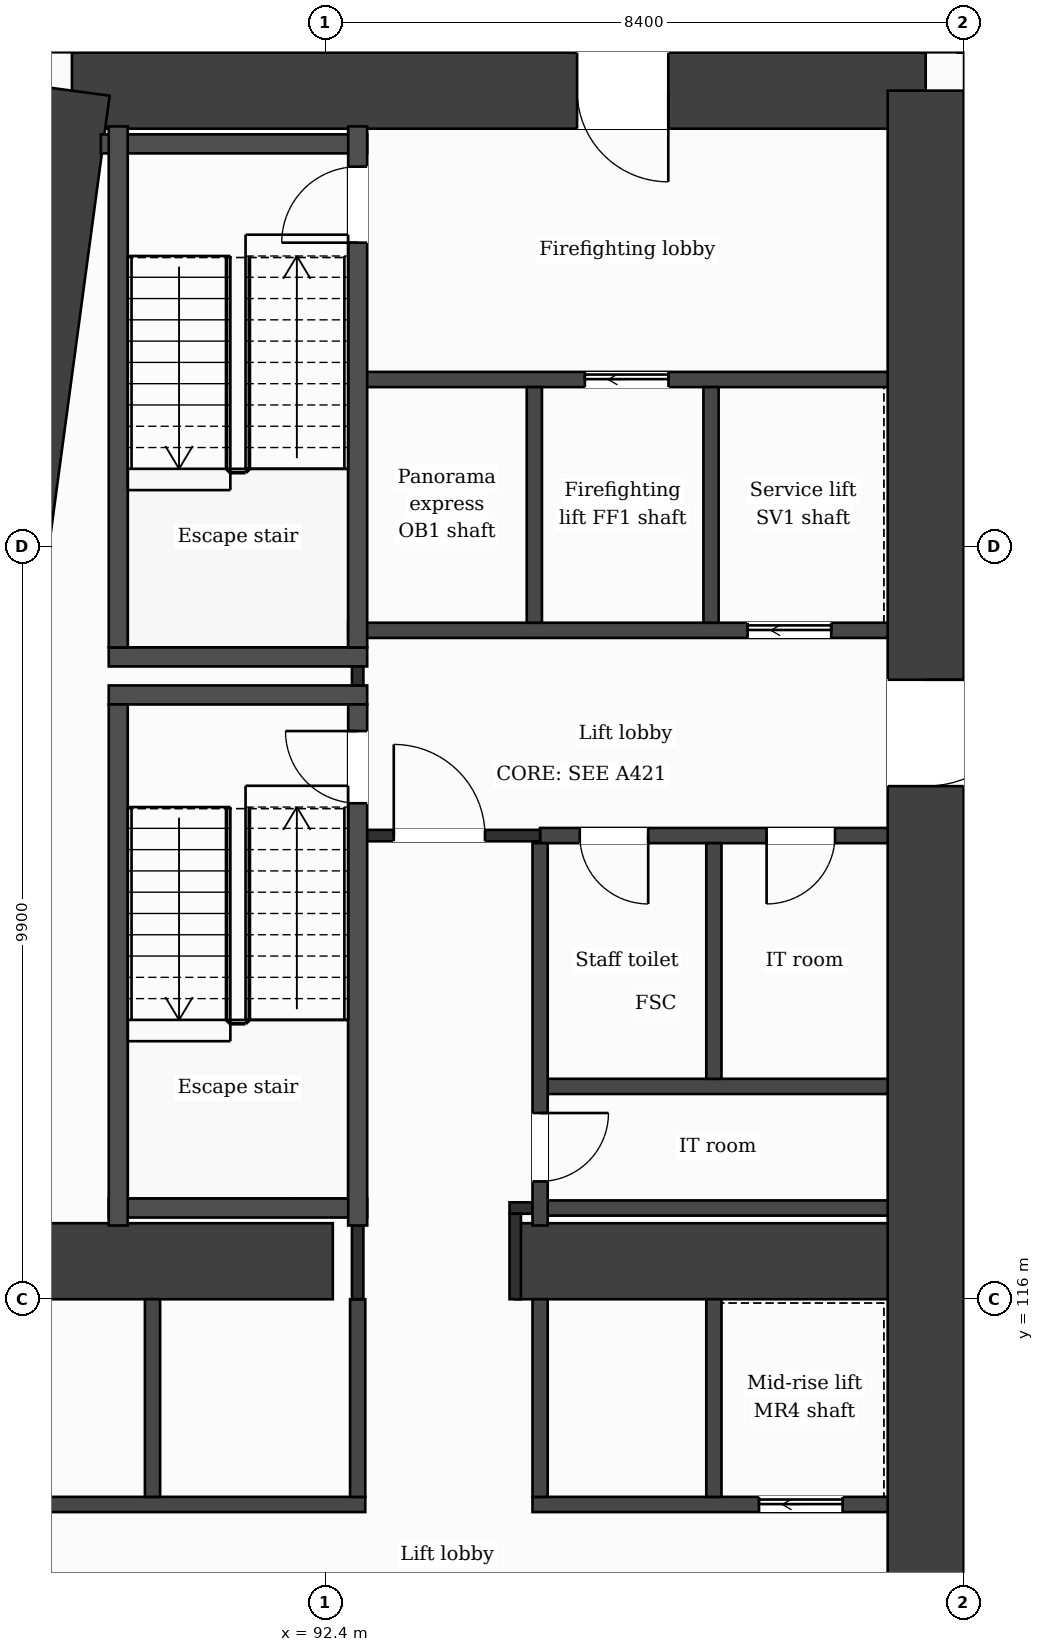
"""IFC4 building model, lengths in metres.
Left out: names, types, materials, properties, quantities, classifications, styles, units other than length and angle.
Written with IfcOpenShell. Run it as: python <this file> out.ifc"""

import sys

from ifc_helpers import new_model, si_unit, direction, frame, frame_2d, origin, place, context, subcontext, project, spatial, rectangle, extrude, element, fill, save


model = new_model("IFC4")
c1 = context("Model", 3, precision=1e-05, world=origin(), true_north=direction((0.0, 1.0)))
c2 = subcontext(c1, "Body", "Model", "MODEL_VIEW")
j1 = project(units=[si_unit("LENGTHUNIT", "METRE"), si_unit("PLANEANGLEUNIT", "RADIAN")], contexts=[c1])
p1 = place(None, origin())
s1 = spatial("IfcSite", under=j1, at=p1, CompositionType="ELEMENT")
p2 = place(p1, origin())
s2 = spatial("IfcBuilding", under=s1, at=p2, CompositionType="ELEMENT")
p3 = place(p2, frame((0.0, 0.0, 91.0)))
s3 = spatial("IfcBuildingStorey", under=s2, at=p3, CompositionType="ELEMENT", Elevation=91.0)
p4 = place(p3, frame((89.068, 131.9, 0.0), z_axis=(0.0, 0.0, 1.0), x_axis=(1.0, 0.0, 0.0)))
e1 = element("IfcWall", 1, at=p4, inside=s3, PredefinedType="SHEAR", context=c2, shape_type="SweptSolid", body=[
    extrude(rectangle(XDim=11.232, YDim=1.0, at=frame_2d((5.616, 0.0))), origin(), (0.0, 0.0, 1.0), 3.7),
])
p5 = place(p4, frame((6.646, 0.0, 0.0)))
e2 = element("IfcOpeningElement", 2, at=p5, cuts=e1, PredefinedType="OPENING", context=c2, shape_type="SweptSolid", body=[
    extrude(rectangle(XDim=1.2, YDim=2.1, at=frame_2d((0.6, 1.05))), frame((0.0, 0.51, 0.0), z_axis=(0.0, -1.0, 0.0), x_axis=(1.0, 0.0, 0.0)), (0.0, 0.0, 1.0), 1.02),
])
p6 = place(p3, frame((100.3, 131.9, 0.0), z_axis=(0.0, 0.0, 1.0), x_axis=(0.0, -1.0, 0.0)))
e3 = element("IfcWall", 3, at=p6, inside=s3, PredefinedType="SHEAR", context=c2, shape_type="SweptSolid", body=[
    extrude(rectangle(XDim=21.0, YDim=1.0, at=frame_2d((10.5, 0.0))), origin(), (0.0, 0.0, 1.0), 3.7),
])
p7 = place(p6, frame((7.75, 0.0, 0.0)))
e4 = element("IfcOpeningElement", 4, at=p7, cuts=e3, PredefinedType="OPENING", context=c2, shape_type="SweptSolid", body=[
    extrude(rectangle(XDim=1.4, YDim=2.1, at=frame_2d((0.7, 1.05))), frame((0.0, 0.51, 0.0), z_axis=(0.0, -1.0, 0.0), x_axis=(1.0, 0.0, 0.0)), (0.0, 0.0, 1.0), 1.02),
])
p8 = place(p3, frame((86.241, 110.9, 0.0), z_axis=(0.0, 0.0, 1.0), x_axis=(0.133411141623, 0.991060778808, 0.0)))
e5 = element("IfcWall", 5, at=p8, inside=s3, PredefinedType="SHEAR", context=c2, shape_type="SweptSolid", body=[
    extrude(rectangle(XDim=21.189, YDim=1.0, at=frame_2d((10.595, 0.0))), origin(), (0.0, 0.0, 1.0), 3.7),
])
p9 = place(p3, frame((87.423, 116.5, 0.0), z_axis=(0.0, 0.0, 1.0), x_axis=(1.0, 0.0, 0.0)))
e6 = element("IfcWall", 6, at=p9, inside=s3, PredefinedType="SHEAR", context=c2, shape_type="SweptSolid", body=[
    extrude(rectangle(XDim=5.077, YDim=1.0, at=frame_2d((2.539, 0.0))), origin(), (0.0, 0.0, 1.0), 3.7),
])
p10 = place(p3, frame((94.9, 116.5, 0.0), z_axis=(0.0, 0.0, 1.0), x_axis=(1.0, 0.0, 0.0)))
e7 = element("IfcWall", 7, at=p10, inside=s3, PredefinedType="SHEAR", context=c2, shape_type="SweptSolid", body=[
    extrude(rectangle(XDim=4.9, YDim=1.0, at=frame_2d((2.45, 0.0))), origin(), (0.0, 0.0, 1.0), 3.7),
])
p11 = place(p3, frame((91.177, 138.95, 0.0), z_axis=(0.0, 0.0, 1.0), x_axis=(-0.133426664613, -0.991058689065, 0.0)))
e8 = element("IfcWall", 8, at=p11, inside=s3, PredefinedType="SOLIDWALL", context=c2, shape_type="SweptSolid", body=[
    extrude(rectangle(XDim=6.609, YDim=0.3, at=frame_2d((3.305, 0.0))), origin(), (0.0, 0.0, 1.0), 3.38),
])
p12 = place(p11, frame((1.039, 0.0, 0.9)))
e9 = element("IfcOpeningElement", 9, at=p12, cuts=e8, PredefinedType="OPENING", context=c2, shape_type="SweptSolid", body=[
    extrude(rectangle(XDim=1.2, YDim=2.1, at=frame_2d((0.6, 1.05))), frame((0.0, 0.16, 0.0), z_axis=(0.0, -1.0, 0.0), x_axis=(1.0, 0.0, 0.0)), (0.0, 0.0, 1.0), 0.32),
])
p13 = place(p11, frame((4.294, 0.0, 0.0)))
e10 = element("IfcOpeningElement", 10, at=p13, cuts=e8, PredefinedType="OPENING", context=c2, shape_type="SweptSolid", body=[
    extrude(rectangle(XDim=1.2, YDim=2.4, at=frame_2d((0.6, 1.2))), frame((0.0, 0.16, 0.0), z_axis=(0.0, -1.0, 0.0), x_axis=(1.0, 0.0, 0.0)), (0.0, 0.0, 1.0), 0.32),
])
p14 = place(p3, frame((87.039, 113.3, 0.0), z_axis=(0.0, 0.0, 1.0), x_axis=(1.0, 0.0, 0.0)))
e11 = element("IfcWall", 11, at=p14, inside=s3, PredefinedType="PARTITIONING", context=c2, shape_type="SweptSolid", body=[
    extrude(rectangle(XDim=5.888, YDim=0.2, at=frame_2d((2.944, 0.0))), origin(), (0.0, 0.0, 1.0), 3.38),
])
p15 = place(p3, frame((95.127, 113.3, 0.0), z_axis=(0.0, 0.0, 1.0), x_axis=(1.0, 0.0, 0.0)))
e12 = element("IfcWall", 12, at=p15, inside=s3, PredefinedType="PARTITIONING", context=c2, shape_type="SweptSolid", body=[
    extrude(rectangle(XDim=4.673, YDim=0.2, at=frame_2d((2.336, 0.0))), origin(), (0.0, 0.0, 1.0), 3.38),
])
p16 = place(p15, frame((2.98, 0.0, 0.0)))
e13 = element("IfcOpeningElement", 13, at=p16, cuts=e12, PredefinedType="OPENING", context=c2, shape_type="SweptSolid", body=[
    extrude(rectangle(XDim=1.1, YDim=2.1, at=frame_2d((0.55, 1.05))), frame((0.0, 0.11, 0.0), z_axis=(0.0, -1.0, 0.0), x_axis=(1.0, 0.0, 0.0)), (0.0, 0.0, 1.0), 0.22),
])
p17 = place(p3, frame((95.227, 117.2, 0.0), z_axis=(0.0, 0.0, 1.0), x_axis=(1.0, 0.0, 0.0)))
e14 = element("IfcWall", 14, at=p17, inside=s3, PredefinedType="PARTITIONING", context=c2, shape_type="SweptSolid", body=[
    extrude(rectangle(XDim=4.573, YDim=0.2, at=frame_2d((2.287, 0.0))), origin(), (0.0, 0.0, 1.0), 3.38),
])
p18 = place(p3, frame((94.825, 117.2, 0.0), z_axis=(0.0, 0.0, 1.0), x_axis=(1.0, 0.0, 0.0)))
e15 = element("IfcWall", 15, at=p18, inside=s3, PredefinedType="PARTITIONING", context=c2, shape_type="SweptSolid", body=[
    extrude(rectangle(XDim=0.402, YDim=0.15, at=frame_2d((0.201, 0.0))), origin(), (0.0, 0.0, 1.0), 3.38),
])
p19 = place(p3, frame((89.552, 117.2, 0.0), z_axis=(0.0, 0.0, 1.0), x_axis=(1.0, 0.0, 0.0)))
e16 = element("IfcWall", 16, at=p19, inside=s3, PredefinedType="PARTITIONING", context=c2, shape_type="SweptSolid", body=[
    extrude(rectangle(XDim=3.4, YDim=0.25, at=frame_2d((1.7, 0.0))), origin(), (0.0, 0.0, 1.0), 3.38),
])
p20 = place(p3, frame((95.227, 118.8, 0.0), z_axis=(0.0, 0.0, 1.0), x_axis=(1.0, 0.0, 0.0)))
e17 = element("IfcWall", 17, at=p20, inside=s3, PredefinedType="PARTITIONING", context=c2, shape_type="SweptSolid", body=[
    extrude(rectangle(XDim=4.573, YDim=0.2, at=frame_2d((2.287, 0.0))), origin(), (0.0, 0.0, 1.0), 3.38),
])
p21 = place(p3, frame((95.227, 122.1, 0.0), z_axis=(0.0, 0.0, 1.0), x_axis=(1.0, 0.0, 0.0)))
e18 = element("IfcWall", 18, at=p21, inside=s3, PredefinedType="PARTITIONING", context=c2, shape_type="SweptSolid", body=[
    extrude(rectangle(XDim=4.573, YDim=0.2, at=frame_2d((2.287, 0.0))), origin(), (0.0, 0.0, 1.0), 3.38),
])
p22 = place(p21, frame((0.522, 0.0, 0.0)))
e19 = element("IfcOpeningElement", 19, at=p22, cuts=e18, PredefinedType="OPENING", context=c2, shape_type="SweptSolid", body=[
    extrude(rectangle(XDim=0.9, YDim=2.1, at=frame_2d((0.45, 1.05))), frame((0.0, 0.11, 0.0), z_axis=(0.0, -1.0, 0.0), x_axis=(1.0, 0.0, 0.0)), (0.0, 0.0, 1.0), 0.22),
])
p23 = place(p21, frame((2.98, 0.0, 0.0)))
e20 = element("IfcOpeningElement", 20, at=p23, cuts=e18, PredefinedType="OPENING", context=c2, shape_type="SweptSolid", body=[
    extrude(rectangle(XDim=0.9, YDim=2.1, at=frame_2d((0.45, 1.05))), frame((0.0, 0.11, 0.0), z_axis=(0.0, -1.0, 0.0), x_axis=(1.0, 0.0, 0.0)), (0.0, 0.0, 1.0), 0.22),
])
p24 = place(p3, frame((92.827, 122.1, 0.0), z_axis=(0.0, 0.0, 1.0), x_axis=(1.0, 0.0, 0.0)))
e21 = element("IfcWall", 21, at=p24, inside=s3, PredefinedType="PARTITIONING", context=c2, shape_type="SweptSolid", body=[
    extrude(rectangle(XDim=2.4, YDim=0.15, at=frame_2d((1.2, 0.0))), origin(), (0.0, 0.0, 1.0), 3.38),
])
p25 = place(p24, frame((0.475, 0.0, 0.0)))
e22 = element("IfcOpeningElement", 22, at=p25, cuts=e21, PredefinedType="OPENING", context=c2, shape_type="SweptSolid", body=[
    extrude(rectangle(XDim=1.2, YDim=2.1, at=frame_2d((0.6, 1.05))), frame((0.0, 0.085, 0.0), z_axis=(0.0, -1.0, 0.0), x_axis=(1.0, 0.0, 0.0)), (0.0, 0.0, 1.0), 0.17),
])
for number, where, z_axis, x_axis in (
    (23, (89.552, 123.95, 0.0), (0.0, 0.0, 1.0), (1.0, 0.0, 0.0)),
    (24, (89.552, 124.45, 0.0), (0.0, 0.0, 1.0), (1.0, 0.0, 0.0)),
):
    element("IfcWall", number, at=place(p3, frame(where, z_axis=z_axis, x_axis=x_axis)), inside=s3, PredefinedType="PARTITIONING", context=c2, shape_type="SweptSolid", body=[
        extrude(rectangle(XDim=3.4, YDim=0.25, at=frame_2d((1.7, 0.0))), origin(), (0.0, 0.0, 1.0), 3.38),
    ])
p26 = place(p3, frame((92.702, 124.8, 0.0), z_axis=(0.0, 0.0, 1.0), x_axis=(1.0, 0.0, 0.0)))
e25 = element("IfcWall", 25, at=p26, inside=s3, PredefinedType="PARTITIONING", context=c2, shape_type="SweptSolid", body=[
    extrude(rectangle(XDim=7.098, YDim=0.2, at=frame_2d((3.549, 0.0))), origin(), (0.0, 0.0, 1.0), 3.38),
])
p27 = place(p26, frame((5.255, 0.0, 0.0)))
e26 = element("IfcOpeningElement", 26, at=p27, cuts=e25, PredefinedType="OPENING", context=c2, shape_type="SweptSolid", body=[
    extrude(rectangle(XDim=1.1, YDim=2.1, at=frame_2d((0.55, 1.05))), frame((0.0, 0.11, 0.0), z_axis=(0.0, -1.0, 0.0), x_axis=(1.0, 0.0, 0.0)), (0.0, 0.0, 1.0), 0.22),
])
p28 = place(p3, frame((92.827, 128.1, 0.0), z_axis=(0.0, 0.0, 1.0), x_axis=(1.0, 0.0, 0.0)))
e27 = element("IfcWall", 27, at=p28, inside=s3, PredefinedType="PARTITIONING", context=c2, shape_type="SweptSolid", body=[
    extrude(rectangle(XDim=6.973, YDim=0.2, at=frame_2d((3.487, 0.0))), origin(), (0.0, 0.0, 1.0), 3.38),
])
p29 = place(p28, frame((2.989, 0.0, 0.0)))
e28 = element("IfcOpeningElement", 28, at=p29, cuts=e27, PredefinedType="OPENING", context=c2, shape_type="SweptSolid", body=[
    extrude(rectangle(XDim=1.1, YDim=2.1, at=frame_2d((0.55, 1.05))), frame((0.0, 0.11, 0.0), z_axis=(0.0, -1.0, 0.0), x_axis=(1.0, 0.0, 0.0)), (0.0, 0.0, 1.0), 0.22),
])
p30 = place(p3, frame((89.448, 131.2, 0.0), z_axis=(0.0, 0.0, 1.0), x_axis=(1.0, 0.0, 0.0)))
e29 = element("IfcWall", 29, at=p30, inside=s3, PredefinedType="PARTITIONING", context=c2, shape_type="SweptSolid", body=[
    extrude(rectangle(XDim=3.504, YDim=0.25, at=frame_2d((1.752, 0.0))), origin(), (0.0, 0.0, 1.0), 3.38),
])
for number, where, z_axis, x_axis in (
    (30, (89.677, 116.97, 0.0), (0.0, 0.0, 1.0), (0.0, 1.0, 0.0)),
    (31, (89.677, 124.575, 0.0), (0.0, 0.0, 1.0), (0.0, 1.0, 0.0)),
):
    element("IfcWall", number, at=place(p3, frame(where, z_axis=z_axis, x_axis=x_axis)), inside=s3, PredefinedType="PARTITIONING", context=c2, shape_type="SweptSolid", body=[
        extrude(rectangle(XDim=6.855, YDim=0.25, at=frame_2d((3.427, 0.0))), origin(), (0.0, 0.0, 1.0), 3.38),
    ])
for number, where, z_axis, x_axis in (
    (32, (90.128, 113.4, 0.0), (0.0, 0.0, 1.0), (0.0, 1.0, 0.0)),
    (33, (92.827, 113.4, 0.0), (0.0, 0.0, 1.0), (0.0, 1.0, 0.0)),
):
    element("IfcWall", number, at=place(p3, frame(where, z_axis=z_axis, x_axis=x_axis)), inside=s3, PredefinedType="PARTITIONING", context=c2, shape_type="SweptSolid", body=[
        extrude(rectangle(XDim=2.6, YDim=0.2, at=frame_2d((1.3, 0.0))), origin(), (0.0, 0.0, 1.0), 3.38),
    ])
p31 = place(p3, frame((92.827, 116.0, 0.0), z_axis=(0.0, 0.0, 1.0), x_axis=(0.0, 1.0, 0.0)))
e34 = element("IfcWall", 34, at=p31, inside=s3, PredefinedType="PARTITIONING", context=c2, shape_type="SweptSolid", body=[
    extrude(rectangle(XDim=0.97, YDim=0.15, at=frame_2d((0.485, 0.0))), origin(), (0.0, 0.0, 1.0), 3.38),
])
p32 = place(p3, frame((92.827, 124.075, 0.0), z_axis=(0.0, 0.0, 1.0), x_axis=(0.0, 1.0, 0.0)))
e35 = element("IfcWall", 35, at=p32, inside=s3, PredefinedType="PARTITIONING", context=c2, shape_type="SweptSolid", body=[
    extrude(rectangle(XDim=0.25, YDim=0.15, at=frame_2d((0.125, 0.0))), origin(), (0.0, 0.0, 1.0), 3.38),
])
p33 = place(p3, frame((92.827, 116.97, 0.0), z_axis=(0.0, 0.0, 1.0), x_axis=(0.0, 1.0, 0.0)))
e36 = element("IfcWall", 36, at=p33, inside=s3, PredefinedType="PARTITIONING", context=c2, shape_type="SweptSolid", body=[
    extrude(rectangle(XDim=6.855, YDim=0.25, at=frame_2d((3.427, 0.0))), origin(), (0.0, 0.0, 1.0), 3.38),
])
p34 = place(p33, frame((5.555, 0.0, 0.0)))
e37 = element("IfcOpeningElement", 37, at=p34, cuts=e36, PredefinedType="OPENING", context=c2, shape_type="SweptSolid", body=[
    extrude(rectangle(XDim=0.95, YDim=2.1, at=frame_2d((0.475, 1.05))), frame((0.0, 0.135, 0.0), z_axis=(0.0, -1.0, 0.0), x_axis=(1.0, 0.0, 0.0)), (0.0, 0.0, 1.0), 0.27),
])
p35 = place(p3, frame((92.827, 124.575, 0.0), z_axis=(0.0, 0.0, 1.0), x_axis=(0.0, 1.0, 0.0)))
e38 = element("IfcWall", 38, at=p35, inside=s3, PredefinedType="PARTITIONING", context=c2, shape_type="SweptSolid", body=[
    extrude(rectangle(XDim=6.855, YDim=0.25, at=frame_2d((3.427, 0.0))), origin(), (0.0, 0.0, 1.0), 3.38),
])
p36 = place(p35, frame((5.325, 0.0, 0.0)))
e39 = element("IfcOpeningElement", 39, at=p36, cuts=e38, PredefinedType="OPENING", context=c2, shape_type="SweptSolid", body=[
    extrude(rectangle(XDim=1.0, YDim=2.1, at=frame_2d((0.5, 1.05))), frame((0.0, 0.135, 0.0), z_axis=(0.0, -1.0, 0.0), x_axis=(1.0, 0.0, 0.0)), (0.0, 0.0, 1.0), 0.27),
])
p37 = place(p3, frame((94.9, 116.0, 0.0), z_axis=(0.0, 0.0, 1.0), x_axis=(0.0, 1.0, 0.0)))
e40 = element("IfcWall", 40, at=p37, inside=s3, PredefinedType="PARTITIONING", context=c2, shape_type="SweptSolid", body=[
    extrude(rectangle(XDim=1.125, YDim=0.15, at=frame_2d((0.562, 0.0))), origin(), (0.0, 0.0, 1.0), 3.38),
])
p38 = place(p3, frame((95.151, 124.9, 0.0), z_axis=(0.0, 0.0, 1.0), x_axis=(0.0, 1.0, 0.0)))
e41 = element("IfcWall", 41, at=p38, inside=s3, PredefinedType="PARTITIONING", context=c2, shape_type="SweptSolid", body=[
    extrude(rectangle(XDim=3.1, YDim=0.2, at=frame_2d((1.55, 0.0))), origin(), (0.0, 0.0, 1.0), 3.38),
])
p39 = place(p3, frame((95.227, 113.4, 0.0), z_axis=(0.0, 0.0, 1.0), x_axis=(0.0, 1.0, 0.0)))
e42 = element("IfcWall", 42, at=p39, inside=s3, PredefinedType="PARTITIONING", context=c2, shape_type="SweptSolid", body=[
    extrude(rectangle(XDim=2.6, YDim=0.2, at=frame_2d((1.3, 0.0))), origin(), (0.0, 0.0, 1.0), 3.38),
])
p40 = place(p3, frame((95.227, 116.97, 0.0), z_axis=(0.0, 0.0, 1.0), x_axis=(0.0, 1.0, 0.0)))
e43 = element("IfcWall", 43, at=p40, inside=s3, PredefinedType="PARTITIONING", context=c2, shape_type="SweptSolid", body=[
    extrude(rectangle(XDim=5.03, YDim=0.2, at=frame_2d((2.515, 0.0))), origin(), (0.0, 0.0, 1.0), 3.38),
])
p41 = place(p40, frame((0.58, 0.0, 0.0)))
e44 = element("IfcOpeningElement", 44, at=p41, cuts=e43, PredefinedType="OPENING", context=c2, shape_type="SweptSolid", body=[
    extrude(rectangle(XDim=0.9, YDim=2.1, at=frame_2d((0.45, 1.05))), frame((0.0, 0.11, 0.0), z_axis=(0.0, -1.0, 0.0), x_axis=(1.0, 0.0, 0.0)), (0.0, 0.0, 1.0), 0.22),
])
p42 = place(p3, frame((97.476, 124.9, 0.0), z_axis=(0.0, 0.0, 1.0), x_axis=(0.0, 1.0, 0.0)))
e45 = element("IfcWall", 45, at=p42, inside=s3, PredefinedType="PARTITIONING", context=c2, shape_type="SweptSolid", body=[
    extrude(rectangle(XDim=3.1, YDim=0.2, at=frame_2d((1.55, 0.0))), origin(), (0.0, 0.0, 1.0), 3.38),
])
p43 = place(p3, frame((97.513, 113.4, 0.0), z_axis=(0.0, 0.0, 1.0), x_axis=(0.0, 1.0, 0.0)))
e46 = element("IfcWall", 46, at=p43, inside=s3, PredefinedType="PARTITIONING", context=c2, shape_type="SweptSolid", body=[
    extrude(rectangle(XDim=2.6, YDim=0.2, at=frame_2d((1.3, 0.0))), origin(), (0.0, 0.0, 1.0), 3.38),
])
p44 = place(p3, frame((97.513, 118.9, 0.0), z_axis=(0.0, 0.0, 1.0), x_axis=(0.0, 1.0, 0.0)))
e47 = element("IfcWall", 47, at=p44, inside=s3, PredefinedType="PARTITIONING", context=c2, shape_type="SweptSolid", body=[
    extrude(rectangle(XDim=3.1, YDim=0.2, at=frame_2d((1.55, 0.0))), origin(), (0.0, 0.0, 1.0), 3.38),
])
p45 = place(p25, origin())
e48 = element("IfcDoor", 48, at=p45, inside=s3, OperationType="SINGLE_SWING_LEFT", PredefinedType="DOOR", context=c2, shape_type="SweptSolid", body=[
    extrude(rectangle(XDim=1.2, YDim=2.1, at=frame_2d((0.6, 1.05))), frame((0.0, 0.025, 0.0), z_axis=(0.0, -1.0, 0.0), x_axis=(1.0, 0.0, 0.0)), (0.0, 0.0, 1.0), 0.05),
])
fill(e22, e48)
p46 = place(p29, origin())
e49 = element("IfcDoor", 49, at=p46, inside=s3, OperationType="SLIDING_TO_LEFT", PredefinedType="DOOR", context=c2, shape_type="SweptSolid", body=[
    extrude(rectangle(XDim=1.1, YDim=2.1, at=frame_2d((0.55, 1.05))), frame((0.0, 0.025, 0.0), z_axis=(0.0, -1.0, 0.0), x_axis=(1.0, 0.0, 0.0)), (0.0, 0.0, 1.0), 0.05),
])
fill(e28, e49)
p47 = place(p27, origin())
e50 = element("IfcDoor", 50, at=p47, inside=s3, OperationType="SLIDING_TO_LEFT", PredefinedType="DOOR", context=c2, shape_type="SweptSolid", body=[
    extrude(rectangle(XDim=1.1, YDim=2.1, at=frame_2d((0.55, 1.05))), frame((0.0, 0.025, 0.0), z_axis=(0.0, -1.0, 0.0), x_axis=(1.0, 0.0, 0.0)), (0.0, 0.0, 1.0), 0.05),
])
fill(e26, e50)
p48 = place(p22, origin())
e51 = element("IfcDoor", 51, at=p48, inside=s3, OperationType="SINGLE_SWING_RIGHT", PredefinedType="DOOR", context=c2, shape_type="SweptSolid", body=[
    extrude(rectangle(XDim=0.9, YDim=2.1, at=frame_2d((0.45, 1.05))), frame((0.0, 0.025, 0.0), z_axis=(0.0, -1.0, 0.0), x_axis=(1.0, 0.0, 0.0)), (0.0, 0.0, 1.0), 0.05),
])
fill(e19, e51)
p49 = place(p23, origin())
e52 = element("IfcDoor", 52, at=p49, inside=s3, OperationType="SINGLE_SWING_LEFT", PredefinedType="DOOR", context=c2, shape_type="SweptSolid", body=[
    extrude(rectangle(XDim=0.9, YDim=2.1, at=frame_2d((0.45, 1.05))), frame((0.0, 0.025, 0.0), z_axis=(0.0, -1.0, 0.0), x_axis=(1.0, 0.0, 0.0)), (0.0, 0.0, 1.0), 0.05),
])
fill(e20, e52)
p50 = place(p34, origin())
e53 = element("IfcDoor", 53, at=p50, inside=s3, OperationType="SINGLE_SWING_RIGHT", PredefinedType="DOOR", context=c2, shape_type="SweptSolid", body=[
    extrude(rectangle(XDim=0.95, YDim=2.1, at=frame_2d((0.475, 1.05))), frame((0.0, 0.025, 0.0), z_axis=(0.0, -1.0, 0.0), x_axis=(1.0, 0.0, 0.0)), (0.0, 0.0, 1.0), 0.05),
])
fill(e37, e53)
p51 = place(p36, origin())
e54 = element("IfcDoor", 54, at=p51, inside=s3, OperationType="SINGLE_SWING_LEFT", PredefinedType="DOOR", context=c2, shape_type="SweptSolid", body=[
    extrude(rectangle(XDim=1.0, YDim=2.1, at=frame_2d((0.5, 1.05))), frame((0.0, 0.025, 0.0), z_axis=(0.0, -1.0, 0.0), x_axis=(1.0, 0.0, 0.0)), (0.0, 0.0, 1.0), 0.05),
])
fill(e39, e54)
p52 = place(p41, origin())
e55 = element("IfcDoor", 55, at=p52, inside=s3, OperationType="SINGLE_SWING_RIGHT", PredefinedType="DOOR", context=c2, shape_type="SweptSolid", body=[
    extrude(rectangle(XDim=0.9, YDim=2.1, at=frame_2d((0.45, 1.05))), frame((0.0, 0.025, 0.0), z_axis=(0.0, -1.0, 0.0), x_axis=(1.0, 0.0, 0.0)), (0.0, 0.0, 1.0), 0.05),
])
fill(e44, e55)
p53 = place(p16, origin())
e56 = element("IfcDoor", 56, at=p53, inside=s3, OperationType="SLIDING_TO_LEFT", PredefinedType="DOOR", context=c2, shape_type="SweptSolid", body=[
    extrude(rectangle(XDim=1.1, YDim=2.1, at=frame_2d((0.55, 1.05))), frame((0.0, 0.025, 0.0), z_axis=(0.0, -1.0, 0.0), x_axis=(1.0, 0.0, 0.0)), (0.0, 0.0, 1.0), 0.05),
])
fill(e13, e56)
p54 = place(p5, origin())
e57 = element("IfcDoor", 57, at=p54, inside=s3, OperationType="SINGLE_SWING_RIGHT", PredefinedType="DOOR", context=c2, shape_type="SweptSolid", body=[
    extrude(rectangle(XDim=1.2, YDim=2.1, at=frame_2d((0.6, 1.05))), frame((0.0, 0.025, 0.0), z_axis=(0.0, -1.0, 0.0), x_axis=(1.0, 0.0, 0.0)), (0.0, 0.0, 1.0), 0.05),
])
fill(e2, e57)
p55 = place(p7, origin())
e58 = element("IfcDoor", 58, at=p55, inside=s3, OperationType="SINGLE_SWING_LEFT", PredefinedType="DOOR", context=c2, shape_type="SweptSolid", body=[
    extrude(rectangle(XDim=1.4, YDim=2.1, at=frame_2d((0.7, 1.05))), frame((0.0, 0.025, 0.0), z_axis=(0.0, -1.0, 0.0), x_axis=(1.0, 0.0, 0.0)), (0.0, 0.0, 1.0), 0.05),
])
fill(e4, e58)
save(model, sys.argv[1])
